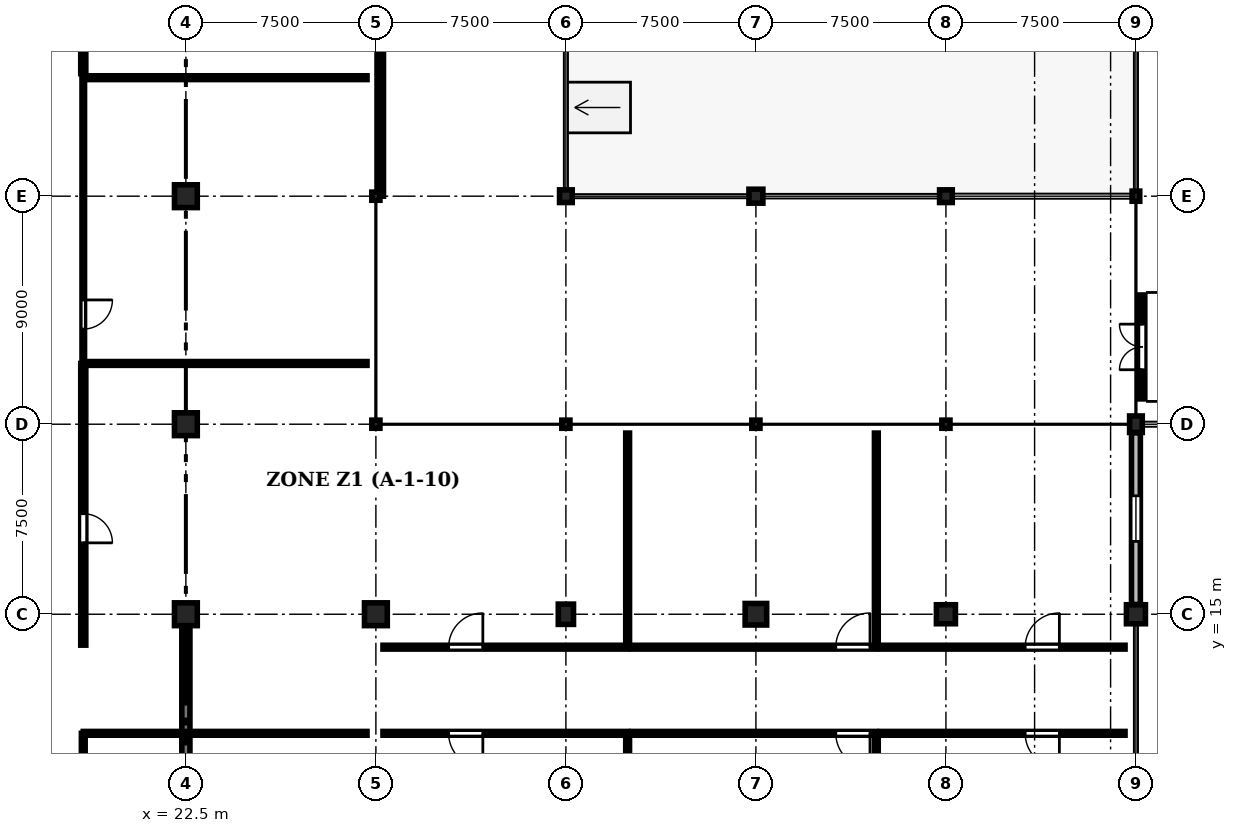
"""IFC4 building model, lengths in metres.
Left out: names, types, materials, properties, quantities, classifications, styles, units other than length and angle.
Written with IfcOpenShell. Run it as: python <this file> out.ifc"""

import sys

from ifc_helpers import new_model, si_unit, direction, frame, frame_2d, origin, origin_2d, place, context, subcontext, project, spatial, rectangle, circle, i_section, extrude, element, fill, save


model = new_model("IFC4")
c1 = context("Model", 3, precision=1e-05, world=origin(), true_north=direction((0.0, 1.0)))
c2 = subcontext(c1, "Body", "Model", "MODEL_VIEW")
j1 = project(units=[si_unit("LENGTHUNIT", "METRE"), si_unit("PLANEANGLEUNIT", "RADIAN")], contexts=[c1])
p1 = place(None, origin())
s1 = spatial("IfcSite", under=j1, at=p1, CompositionType="ELEMENT")
p2 = place(p1, origin())
s2 = spatial("IfcBuilding", under=s1, at=p2, CompositionType="ELEMENT")
p3 = place(p2, origin())
s3 = spatial("IfcBuildingStorey", under=s2, at=p3, CompositionType="ELEMENT", Elevation=0.0)
p4 = place(p3, frame((22.5, 15.0, 0.0), z_axis=(0.0, 0.0, 1.0), x_axis=(1.0, 0.0, 0.0)))
e1 = element("IfcColumn", 1, at=p4, inside=s3, PredefinedType="COLUMN", context=c2, shape_type="SweptSolid", body=[
    extrude(rectangle(XDim=0.9, YDim=0.9, at=origin_2d()), origin(), (0.0, 0.0, 1.0), 4.8),
])
p5 = place(p3, frame((22.5, 22.5, 0.0), z_axis=(0.0, 0.0, 1.0), x_axis=(1.0, 0.0, 0.0)))
e2 = element("IfcColumn", 2, at=p5, inside=s3, PredefinedType="COLUMN", context=c2, shape_type="SweptSolid", body=[
    extrude(circle(Radius=0.45, at=origin_2d()), origin(), (0.0, 0.0, 1.0), 4.8),
])
p6 = place(p3, frame((22.5, 31.5, 0.0), z_axis=(0.0, 0.0, 1.0), x_axis=(1.0, 0.0, 0.0)))
e3 = element("IfcColumn", 3, at=p6, inside=s3, PredefinedType="COLUMN", context=c2, shape_type="SweptSolid", body=[
    extrude(rectangle(XDim=0.9, YDim=0.9, at=origin_2d()), origin(), (0.0, 0.0, 1.0), 4.8),
])
p7 = place(p3, frame((30.0, 15.0, 0.0), z_axis=(0.0, 0.0, 1.0), x_axis=(1.0, 0.0, 0.0)))
e4 = element("IfcColumn", 4, at=p7, inside=s3, PredefinedType="COLUMN", context=c2, shape_type="SweptSolid", body=[
    extrude(circle(Radius=0.45, at=origin_2d()), origin(), (0.0, 0.0, 1.0), 4.8),
])
for number, where, z_axis, x_axis in (
    (5, (30.0, 22.5, 0.0), (0.0, 0.0, 1.0), (1.0, 0.0, 0.0)),
    (6, (30.0, 31.5, 0.0), (0.0, 0.0, 1.0), (1.0, 0.0, 0.0)),
):
    element("IfcColumn", number, at=place(p3, frame(where, z_axis=z_axis, x_axis=x_axis)), inside=s3, PredefinedType="COLUMN", context=c2, shape_type="SweptSolid", body=[
        extrude(rectangle(XDim=0.32, YDim=0.32, at=origin_2d()), origin(), (0.0, 0.0, 1.0), 4.8),
    ])
p8 = place(p3, frame((37.5, 15.0, 0.0), z_axis=(0.0, 0.0, 1.0), x_axis=(1.0, 0.0, 0.0)))
e7 = element("IfcColumn", 7, at=p8, inside=s3, PredefinedType="COLUMN", context=c2, shape_type="SweptSolid", body=[
    extrude(rectangle(XDim=0.6, YDim=0.8, at=origin_2d()), origin(), (0.0, 0.0, 1.0), 4.8),
])
p9 = place(p3, frame((37.5, 22.5, 0.0), z_axis=(0.0, 0.0, 1.0), x_axis=(1.0, 0.0, 0.0)))
e8 = element("IfcColumn", 8, at=p9, inside=s3, PredefinedType="COLUMN", context=c2, shape_type="SweptSolid", body=[
    extrude(rectangle(XDim=0.32, YDim=0.32, at=origin_2d()), origin(), (0.0, 0.0, 1.0), 4.8),
])
p10 = place(p3, frame((37.5, 31.5, 0.0), z_axis=(0.0, 0.0, 1.0), x_axis=(1.0, 0.0, 0.0)))
e9 = element("IfcColumn", 9, at=p10, inside=s3, PredefinedType="COLUMN", context=c2, shape_type="SweptSolid", body=[
    extrude(rectangle(XDim=0.5, YDim=0.5, at=origin_2d()), origin(), (0.0, 0.0, 1.0), 4.8),
])
p11 = place(p3, frame((45.0, 15.0, 0.0), z_axis=(0.0, 0.0, 1.0), x_axis=(1.0, 0.0, 0.0)))
e10 = element("IfcColumn", 10, at=p11, inside=s3, PredefinedType="COLUMN", context=c2, shape_type="SweptSolid", body=[
    extrude(rectangle(XDim=0.85, YDim=0.85, at=origin_2d()), origin(), (0.0, 0.0, 1.0), 4.8),
])
p12 = place(p3, frame((45.0, 22.5, 0.0), z_axis=(0.0, 0.0, 1.0), x_axis=(1.0, 0.0, 0.0)))
e11 = element("IfcColumn", 11, at=p12, inside=s3, PredefinedType="COLUMN", context=c2, shape_type="SweptSolid", body=[
    extrude(rectangle(XDim=0.32, YDim=0.32, at=origin_2d()), origin(), (0.0, 0.0, 1.0), 4.8),
])
p13 = place(p3, frame((45.0, 31.5, 0.0), z_axis=(0.0, 0.0, 1.0), x_axis=(1.0, 0.0, 0.0)))
e12 = element("IfcColumn", 12, at=p13, inside=s3, PredefinedType="COLUMN", context=c2, shape_type="SweptSolid", body=[
    extrude(rectangle(XDim=0.55, YDim=0.55, at=origin_2d()), origin(), (0.0, 0.0, 1.0), 4.8),
])
p14 = place(p3, frame((52.5, 15.0, 0.0), z_axis=(0.0, 0.0, 1.0), x_axis=(1.0, 0.0, 0.0)))
e13 = element("IfcColumn", 13, at=p14, inside=s3, PredefinedType="COLUMN", context=c2, shape_type="SweptSolid", body=[
    extrude(circle(Radius=0.375, at=origin_2d()), origin(), (0.0, 0.0, 1.0), 4.8),
])
p15 = place(p3, frame((52.5, 22.5, 0.0), z_axis=(0.0, 0.0, 1.0), x_axis=(1.0, 0.0, 0.0)))
e14 = element("IfcColumn", 14, at=p15, inside=s3, PredefinedType="COLUMN", context=c2, shape_type="SweptSolid", body=[
    extrude(rectangle(XDim=0.32, YDim=0.32, at=origin_2d()), origin(), (0.0, 0.0, 1.0), 4.8),
])
p16 = place(p3, frame((52.5, 31.5, 0.0), z_axis=(0.0, 0.0, 1.0), x_axis=(1.0, 0.0, 0.0)))
e15 = element("IfcColumn", 15, at=p16, inside=s3, PredefinedType="COLUMN", context=c2, shape_type="SweptSolid", body=[
    extrude(rectangle(XDim=0.5, YDim=0.5, at=origin_2d()), origin(), (0.0, 0.0, 1.0), 4.8),
])
p17 = place(p3, frame((60.0, 15.0, 0.0), z_axis=(0.0, 0.0, 1.0), x_axis=(1.0, 0.0, 0.0)))
e16 = element("IfcColumn", 16, at=p17, inside=s3, PredefinedType="COLUMN", context=c2, shape_type="SweptSolid", body=[
    extrude(rectangle(XDim=0.75, YDim=0.75, at=origin_2d()), origin(), (0.0, 0.0, 1.0), 4.8),
])
p18 = place(p3, frame((60.0, 22.5, 0.0), z_axis=(0.0, 0.0, 1.0), x_axis=(1.0, 0.0, 0.0)))
e17 = element("IfcColumn", 17, at=p18, inside=s3, PredefinedType="COLUMN", context=c2, shape_type="SweptSolid", body=[
    extrude(rectangle(XDim=0.5, YDim=0.65, at=origin_2d()), origin(), (0.0, 0.0, 1.0), 4.8),
])
p19 = place(p3, frame((60.0, 31.5, 0.0), z_axis=(0.0, 0.0, 1.0), x_axis=(1.0, 0.0, 0.0)))
e18 = element("IfcColumn", 18, at=p19, inside=s3, PredefinedType="COLUMN", context=c2, shape_type="SweptSolid", body=[
    extrude(i_section(OverallWidth=0.3, OverallDepth=0.4, WebThickness=0.013, FlangeThickness=0.024, FilletRadius=0.027, at=origin_2d()), origin(), (0.0, 0.0, 1.0), 4.8),
])
p20 = place(p3, frame((22.5, 7.95, 0.0), z_axis=(0.0, 0.0, 1.0), x_axis=(0.0, 1.0, 0.0)))
e19 = element("IfcWall", 19, at=p20, inside=s3, PredefinedType="SHEAR", context=c2, shape_type="SweptSolid", body=[
    extrude(rectangle(XDim=6.6, YDim=0.32, at=frame_2d((3.3, 0.0))), origin(), (0.0, 0.0, 1.0), 3.95),
])
p21 = place(p3, frame((60.0, 22.165, 0.0), z_axis=(0.0, 0.0, 1.0), x_axis=(0.0, -1.0, 0.0)))
e20 = element("IfcWall", 20, at=p21, inside=s3, PredefinedType="STANDARD", context=c2, shape_type="SweptSolid", body=[
    extrude(rectangle(XDim=6.78, YDim=0.35, at=frame_2d((3.39, 0.0))), origin(), (0.0, 0.0, 1.0), 3.9),
])
p22 = place(p21, frame((2.49, 0.0, 0.9)))
e21 = element("IfcOpeningElement", 21, at=p22, cuts=e20, PredefinedType="OPENING", context=c2, shape_type="SweptSolid", body=[
    extrude(rectangle(XDim=1.8, YDim=1.95, at=frame_2d((0.9, 0.975))), frame((0.0, 0.185, 0.0), z_axis=(0.0, -1.0, 0.0), x_axis=(1.0, 0.0, 0.0)), (0.0, 0.0, 1.0), 0.37),
])
p23 = place(p3, frame((60.25, 23.5, 0.0), z_axis=(0.0, 0.0, 1.0), x_axis=(0.0, 1.0, 0.0)))
e22 = element("IfcWall", 22, at=p23, inside=s3, PredefinedType="STANDARD", context=c2, shape_type="SweptSolid", body=[
    extrude(rectangle(XDim=4.1, YDim=0.2, at=frame_2d((2.05, 0.0))), origin(), (0.0, 0.0, 1.0), 3.785),
])
p24 = place(p23, frame((1.15, 0.0, 0.0)))
e23 = element("IfcOpeningElement", 23, at=p24, cuts=e22, PredefinedType="OPENING", context=c2, shape_type="SweptSolid", body=[
    extrude(rectangle(XDim=1.8, YDim=2.25, at=frame_2d((0.9, 1.125))), frame((0.0, 0.11, 0.0), z_axis=(0.0, -1.0, 0.0), x_axis=(1.0, 0.0, 0.0)), (0.0, 0.0, 1.0), 0.22),
])
p25 = place(p3, frame((18.45, 10.3, 0.0), z_axis=(0.0, 0.0, 1.0), x_axis=(0.0, -1.0, 0.0)))
e24 = element("IfcWall", 24, at=p25, inside=s3, PredefinedType="PARTITIONING", context=c2, shape_type="SweptSolid", body=[
    extrude(rectangle(XDim=9.95, YDim=0.15, at=frame_2d((4.975, 0.0))), origin(), (0.0, 0.0, 1.0), 4.485),
])
p26 = place(p25, frame((5.92, 0.0, 0.0)))
e25 = element("IfcOpeningElement", 25, at=p26, cuts=e24, PredefinedType="OPENING", context=c2, shape_type="SweptSolid", body=[
    extrude(rectangle(XDim=1.35, YDim=2.25, at=frame_2d((0.675, 1.125))), frame((0.0, 0.085, 0.0), z_axis=(0.0, -1.0, 0.0), x_axis=(1.0, 0.0, 0.0)), (0.0, 0.0, 1.0), 0.17),
])
p27 = place(p3, frame((18.45, 24.899, 0.0), z_axis=(0.0, 0.0, 1.0), x_axis=(0.0, -1.0, 0.0)))
e26 = element("IfcWall", 26, at=p27, inside=s3, PredefinedType="STANDARD", context=c2, shape_type="SweptSolid", body=[
    extrude(rectangle(XDim=11.119, YDim=0.2, at=frame_2d((5.559, 0.0))), origin(), (0.0, 0.0, 1.0), 4.085),
])
p28 = place(p27, frame((5.931, 0.0, 0.0)))
e27 = element("IfcOpeningElement", 27, at=p28, cuts=e26, PredefinedType="OPENING", context=c2, shape_type="SweptSolid", body=[
    extrude(rectangle(XDim=1.15, YDim=2.2, at=frame_2d((0.575, 1.1))), frame((0.0, 0.11, 0.0), z_axis=(0.0, -1.0, 0.0), x_axis=(1.0, 0.0, 0.0)), (0.0, 0.0, 1.0), 0.22),
])
p29 = place(p3, frame((18.45, 36.177, 0.0), z_axis=(0.0, 0.0, 1.0), x_axis=(0.0, -1.0, 0.0)))
e28 = element("IfcWall", 28, at=p29, inside=s3, PredefinedType="PARTITIONING", context=c2, shape_type="SweptSolid", body=[
    extrude(rectangle(XDim=11.118, YDim=0.1, at=frame_2d((5.559, 0.0))), origin(), (0.0, 0.0, 1.0), 4.085),
])
p30 = place(p29, frame((8.771, 0.0, 0.0)))
e29 = element("IfcOpeningElement", 29, at=p30, cuts=e28, PredefinedType="OPENING", context=c2, shape_type="SweptSolid", body=[
    extrude(rectangle(XDim=1.15, YDim=2.2, at=frame_2d((0.575, 1.1))), frame((0.0, 0.06, 0.0), z_axis=(0.0, -1.0, 0.0), x_axis=(1.0, 0.0, 0.0)), (0.0, 0.0, 1.0), 0.12),
])
p31 = place(p3, frame((18.45, 47.456, 0.0), z_axis=(0.0, 0.0, 1.0), x_axis=(0.0, -1.0, 0.0)))
e30 = element("IfcWall", 30, at=p31, inside=s3, PredefinedType="STANDARD", context=c2, shape_type="SweptSolid", body=[
    extrude(rectangle(XDim=11.119, YDim=0.2, at=frame_2d((5.559, 0.0))), origin(), (0.0, 0.0, 1.0), 4.485),
])
p32 = place(p31, frame((4.077, 0.0, 0.0)))
e31 = element("IfcOpeningElement", 31, at=p32, cuts=e30, PredefinedType="OPENING", context=c2, shape_type="SweptSolid", body=[
    extrude(rectangle(XDim=1.05, YDim=2.2, at=frame_2d((0.525, 1.1))), frame((0.0, 0.11, 0.0), z_axis=(0.0, -1.0, 0.0), x_axis=(1.0, 0.0, 0.0)), (0.0, 0.0, 1.0), 0.22),
])
p33 = place(p3, frame((39.937, 10.3, 0.0), z_axis=(0.0, 0.0, 1.0), x_axis=(-1.0, 0.0, 0.0)))
e32 = element("IfcWall", 32, at=p33, inside=s3, PredefinedType="PARTITIONING", context=c2, shape_type="SweptSolid", body=[
    extrude(rectangle(XDim=9.657, YDim=0.15, at=frame_2d((4.828, 0.0))), origin(), (0.0, 0.0, 1.0), 4.485),
])
p34 = place(p33, frame((5.715, 0.0, 0.0)))
e33 = element("IfcOpeningElement", 33, at=p34, cuts=e32, PredefinedType="OPENING", context=c2, shape_type="SweptSolid", body=[
    extrude(rectangle(XDim=1.35, YDim=2.25, at=frame_2d((0.675, 1.125))), frame((0.0, 0.085, 0.0), z_axis=(0.0, -1.0, 0.0), x_axis=(1.0, 0.0, 0.0)), (0.0, 0.0, 1.0), 0.17),
])
p35 = place(p3, frame((30.28, 13.7, 0.0), z_axis=(0.0, 0.0, 1.0), x_axis=(1.0, 0.0, 0.0)))
e34 = element("IfcWall", 34, at=p35, inside=s3, PredefinedType="PARTITIONING", context=c2, shape_type="SweptSolid", body=[
    extrude(rectangle(XDim=9.657, YDim=0.15, at=frame_2d((4.828, 0.0))), origin(), (0.0, 0.0, 1.0), 4.485),
])
p36 = place(p35, frame((2.592, 0.0, 0.0)))
e35 = element("IfcOpeningElement", 35, at=p36, cuts=e34, PredefinedType="OPENING", context=c2, shape_type="SweptSolid", body=[
    extrude(rectangle(XDim=1.35, YDim=2.25, at=frame_2d((0.675, 1.125))), frame((0.0, 0.085, 0.0), z_axis=(0.0, -1.0, 0.0), x_axis=(1.0, 0.0, 0.0)), (0.0, 0.0, 1.0), 0.17),
])
p37 = place(p3, frame((49.753, 10.3, 0.0), z_axis=(0.0, 0.0, 1.0), x_axis=(-1.0, 0.0, 0.0)))
e36 = element("IfcWall", 36, at=p37, inside=s3, PredefinedType="PARTITIONING", context=c2, shape_type="SweptSolid", body=[
    extrude(rectangle(XDim=9.657, YDim=0.15, at=frame_2d((4.828, 0.0))), origin(), (0.0, 0.0, 1.0), 4.485),
])
p38 = place(p37, frame((0.25, 0.0, 0.0)))
e37 = element("IfcOpeningElement", 37, at=p38, cuts=e36, PredefinedType="OPENING", context=c2, shape_type="SweptSolid", body=[
    extrude(rectangle(XDim=1.35, YDim=2.25, at=frame_2d((0.675, 1.125))), frame((0.0, 0.085, 0.0), z_axis=(0.0, -1.0, 0.0), x_axis=(1.0, 0.0, 0.0)), (0.0, 0.0, 1.0), 0.17),
])
p39 = place(p3, frame((40.097, 13.7, 0.0), z_axis=(0.0, 0.0, 1.0), x_axis=(1.0, 0.0, 0.0)))
e38 = element("IfcWall", 38, at=p39, inside=s3, PredefinedType="PARTITIONING", context=c2, shape_type="SweptSolid", body=[
    extrude(rectangle(XDim=9.657, YDim=0.15, at=frame_2d((4.828, 0.0))), origin(), (0.0, 0.0, 1.0), 4.485),
])
p40 = place(p39, frame((8.057, 0.0, 0.0)))
e39 = element("IfcOpeningElement", 39, at=p40, cuts=e38, PredefinedType="OPENING", context=c2, shape_type="SweptSolid", body=[
    extrude(rectangle(XDim=1.35, YDim=2.25, at=frame_2d((0.675, 1.125))), frame((0.0, 0.085, 0.0), z_axis=(0.0, -1.0, 0.0), x_axis=(1.0, 0.0, 0.0)), (0.0, 0.0, 1.0), 0.17),
])
p41 = place(p3, frame((59.57, 10.3, 0.0), z_axis=(0.0, 0.0, 1.0), x_axis=(-1.0, 0.0, 0.0)))
e40 = element("IfcWall", 40, at=p41, inside=s3, PredefinedType="PARTITIONING", context=c2, shape_type="SweptSolid", body=[
    extrude(rectangle(XDim=9.657, YDim=0.15, at=frame_2d((4.828, 0.0))), origin(), (0.0, 0.0, 1.0), 4.485),
])
p42 = place(p41, frame((2.592, 0.0, 0.0)))
e41 = element("IfcOpeningElement", 41, at=p42, cuts=e40, PredefinedType="OPENING", context=c2, shape_type="SweptSolid", body=[
    extrude(rectangle(XDim=1.35, YDim=2.25, at=frame_2d((0.675, 1.125))), frame((0.0, 0.085, 0.0), z_axis=(0.0, -1.0, 0.0), x_axis=(1.0, 0.0, 0.0)), (0.0, 0.0, 1.0), 0.17),
])
p43 = place(p3, frame((49.913, 13.7, 0.0), z_axis=(0.0, 0.0, 1.0), x_axis=(1.0, 0.0, 0.0)))
e42 = element("IfcWall", 42, at=p43, inside=s3, PredefinedType="PARTITIONING", context=c2, shape_type="SweptSolid", body=[
    extrude(rectangle(XDim=9.657, YDim=0.15, at=frame_2d((4.828, 0.0))), origin(), (0.0, 0.0, 1.0), 4.485),
])
p44 = place(p43, frame((5.715, 0.0, 0.0)))
e43 = element("IfcOpeningElement", 43, at=p44, cuts=e42, PredefinedType="OPENING", context=c2, shape_type="SweptSolid", body=[
    extrude(rectangle(XDim=1.35, YDim=2.25, at=frame_2d((0.675, 1.125))), frame((0.0, 0.085, 0.0), z_axis=(0.0, -1.0, 0.0), x_axis=(1.0, 0.0, 0.0)), (0.0, 0.0, 1.0), 0.17),
])
p45 = place(p3, frame((30.2, 76.15, 0.0), z_axis=(0.0, 0.0, 1.0), x_axis=(0.0, -1.0, 0.0)))
e44 = element("IfcWall", 44, at=p45, inside=s3, PredefinedType="STANDARD", context=c2, shape_type="SweptSolid", body=[
    extrude(rectangle(XDim=44.65, YDim=0.2, at=frame_2d((22.325, 0.0))), origin(), (0.0, 0.0, 1.0), 3.935),
])
p46 = place(p45, frame((17.49, 0.0, 0.0)))
e45 = element("IfcOpeningElement", 45, at=p46, cuts=e44, PredefinedType="OPENING", context=c2, shape_type="SweptSolid", body=[
    extrude(rectangle(XDim=1.05, YDim=2.2, at=frame_2d((0.525, 1.1))), frame((0.0, 0.11, 0.0), z_axis=(0.0, -1.0, 0.0), x_axis=(1.0, 0.0, 0.0)), (0.0, 0.0, 1.0), 0.22),
])
for number, where, z_axis, x_axis in (
    (46, (18.45, 10.3, 0.0), (0.0, 0.0, 1.0), (1.0, 0.0, 0.0)),
    (47, (18.45, 24.899, 0.0), (0.0, 0.0, 1.0), (1.0, 0.0, 0.0)),
    (48, (18.45, 36.177, 0.0), (0.0, 0.0, 1.0), (1.0, 0.0, 0.0)),
):
    element("IfcWall", number, at=place(p3, frame(where, z_axis=z_axis, x_axis=x_axis)), inside=s3, PredefinedType="PARTITIONING", context=c2, shape_type="SweptSolid", body=[
        extrude(rectangle(XDim=11.2, YDim=0.15, at=frame_2d((5.6, 0.0))), origin(), (0.0, 0.0, 1.0), 4.485),
    ])
p47 = place(p3, frame((39.937, 0.35, 0.0), z_axis=(0.0, 0.0, 1.0), x_axis=(0.0, 1.0, 0.0)))
e49 = element("IfcWall", 49, at=p47, inside=s3, PredefinedType="PARTITIONING", context=c2, shape_type="SweptSolid", body=[
    extrude(rectangle(XDim=9.95, YDim=0.15, at=frame_2d((4.975, 0.0))), origin(), (0.0, 0.0, 1.0), 4.485),
])
p48 = place(p3, frame((39.937, 13.7, 0.0), z_axis=(0.0, 0.0, 1.0), x_axis=(0.0, 1.0, 0.0)))
e50 = element("IfcWall", 50, at=p48, inside=s3, PredefinedType="PARTITIONING", context=c2, shape_type="SweptSolid", body=[
    extrude(rectangle(XDim=8.45, YDim=0.15, at=frame_2d((4.225, 0.0))), origin(), (0.0, 0.0, 1.0), 4.485),
])
p49 = place(p3, frame((49.753, 0.35, 0.0), z_axis=(0.0, 0.0, 1.0), x_axis=(0.0, 1.0, 0.0)))
e51 = element("IfcWall", 51, at=p49, inside=s3, PredefinedType="PARTITIONING", context=c2, shape_type="SweptSolid", body=[
    extrude(rectangle(XDim=9.95, YDim=0.15, at=frame_2d((4.975, 0.0))), origin(), (0.0, 0.0, 1.0), 4.485),
])
p50 = place(p3, frame((49.753, 13.7, 0.0), z_axis=(0.0, 0.0, 1.0), x_axis=(0.0, 1.0, 0.0)))
e52 = element("IfcWall", 52, at=p50, inside=s3, PredefinedType="PARTITIONING", context=c2, shape_type="SweptSolid", body=[
    extrude(rectangle(XDim=8.45, YDim=0.15, at=frame_2d((4.225, 0.0))), origin(), (0.0, 0.0, 1.0), 4.485),
])
p51 = place(p22, origin())
e53 = element("IfcWindow", 53, at=p51, inside=s3, PartitioningType="SINGLE_PANEL", PredefinedType="WINDOW", context=c2, shape_type="SweptSolid", body=[
    extrude(rectangle(XDim=1.8, YDim=1.95, at=frame_2d((0.9, 0.975))), frame((0.0, 0.03, 0.0), z_axis=(0.0, -1.0, 0.0), x_axis=(1.0, 0.0, 0.0)), (0.0, 0.0, 1.0), 0.06),
])
fill(e21, e53)
p52 = place(p24, origin())
e54 = element("IfcDoor", 54, at=p52, inside=s3, OperationType="DOUBLE_DOOR_SINGLE_SWING", PredefinedType="DOOR", context=c2, shape_type="SweptSolid", body=[
    extrude(rectangle(XDim=1.8, YDim=2.25, at=frame_2d((0.9, 1.125))), frame((0.0, 0.025, 0.0), z_axis=(0.0, -1.0, 0.0), x_axis=(1.0, 0.0, 0.0)), (0.0, 0.0, 1.0), 0.05),
])
fill(e23, e54)
p53 = place(p28, origin())
e55 = element("IfcDoor", 55, at=p53, inside=s3, OperationType="SINGLE_SWING_RIGHT", PredefinedType="DOOR", context=c2, shape_type="SweptSolid", body=[
    extrude(rectangle(XDim=1.15, YDim=2.2, at=frame_2d((0.575, 1.1))), frame((0.0, 0.025, 0.0), z_axis=(0.0, -1.0, 0.0), x_axis=(1.0, 0.0, 0.0)), (0.0, 0.0, 1.0), 0.05),
])
fill(e27, e55)
p54 = place(p30, origin())
e56 = element("IfcDoor", 56, at=p54, inside=s3, OperationType="SINGLE_SWING_LEFT", PredefinedType="DOOR", context=c2, shape_type="SweptSolid", body=[
    extrude(rectangle(XDim=1.15, YDim=2.2, at=frame_2d((0.575, 1.1))), frame((0.0, 0.025, 0.0), z_axis=(0.0, -1.0, 0.0), x_axis=(1.0, 0.0, 0.0)), (0.0, 0.0, 1.0), 0.05),
])
fill(e29, e56)
p55 = place(p34, origin())
e57 = element("IfcDoor", 57, at=p55, inside=s3, OperationType="SINGLE_SWING_LEFT", PredefinedType="DOOR", context=c2, shape_type="SweptSolid", body=[
    extrude(rectangle(XDim=1.35, YDim=2.25, at=frame_2d((0.675, 1.125))), frame((0.0, 0.025, 0.0), z_axis=(0.0, -1.0, 0.0), x_axis=(1.0, 0.0, 0.0)), (0.0, 0.0, 1.0), 0.05),
])
fill(e33, e57)
p56 = place(p36, origin())
e58 = element("IfcDoor", 58, at=p56, inside=s3, OperationType="SINGLE_SWING_RIGHT", PredefinedType="DOOR", context=c2, shape_type="SweptSolid", body=[
    extrude(rectangle(XDim=1.35, YDim=2.25, at=frame_2d((0.675, 1.125))), frame((0.0, 0.025, 0.0), z_axis=(0.0, -1.0, 0.0), x_axis=(1.0, 0.0, 0.0)), (0.0, 0.0, 1.0), 0.05),
])
fill(e35, e58)
p57 = place(p38, origin())
e59 = element("IfcDoor", 59, at=p57, inside=s3, OperationType="SINGLE_SWING_LEFT", PredefinedType="DOOR", context=c2, shape_type="SweptSolid", body=[
    extrude(rectangle(XDim=1.35, YDim=2.25, at=frame_2d((0.675, 1.125))), frame((0.0, 0.025, 0.0), z_axis=(0.0, -1.0, 0.0), x_axis=(1.0, 0.0, 0.0)), (0.0, 0.0, 1.0), 0.05),
])
fill(e37, e59)
p58 = place(p40, origin())
e60 = element("IfcDoor", 60, at=p58, inside=s3, OperationType="SINGLE_SWING_RIGHT", PredefinedType="DOOR", context=c2, shape_type="SweptSolid", body=[
    extrude(rectangle(XDim=1.35, YDim=2.25, at=frame_2d((0.675, 1.125))), frame((0.0, 0.025, 0.0), z_axis=(0.0, -1.0, 0.0), x_axis=(1.0, 0.0, 0.0)), (0.0, 0.0, 1.0), 0.05),
])
fill(e39, e60)
p59 = place(p42, origin())
e61 = element("IfcDoor", 61, at=p59, inside=s3, OperationType="SINGLE_SWING_LEFT", PredefinedType="DOOR", context=c2, shape_type="SweptSolid", body=[
    extrude(rectangle(XDim=1.35, YDim=2.25, at=frame_2d((0.675, 1.125))), frame((0.0, 0.025, 0.0), z_axis=(0.0, -1.0, 0.0), x_axis=(1.0, 0.0, 0.0)), (0.0, 0.0, 1.0), 0.05),
])
fill(e41, e61)
p60 = place(p44, origin())
e62 = element("IfcDoor", 62, at=p60, inside=s3, OperationType="SINGLE_SWING_RIGHT", PredefinedType="DOOR", context=c2, shape_type="SweptSolid", body=[
    extrude(rectangle(XDim=1.35, YDim=2.25, at=frame_2d((0.675, 1.125))), frame((0.0, 0.025, 0.0), z_axis=(0.0, -1.0, 0.0), x_axis=(1.0, 0.0, 0.0)), (0.0, 0.0, 1.0), 0.05),
])
fill(e43, e62)
save(model, sys.argv[1])
